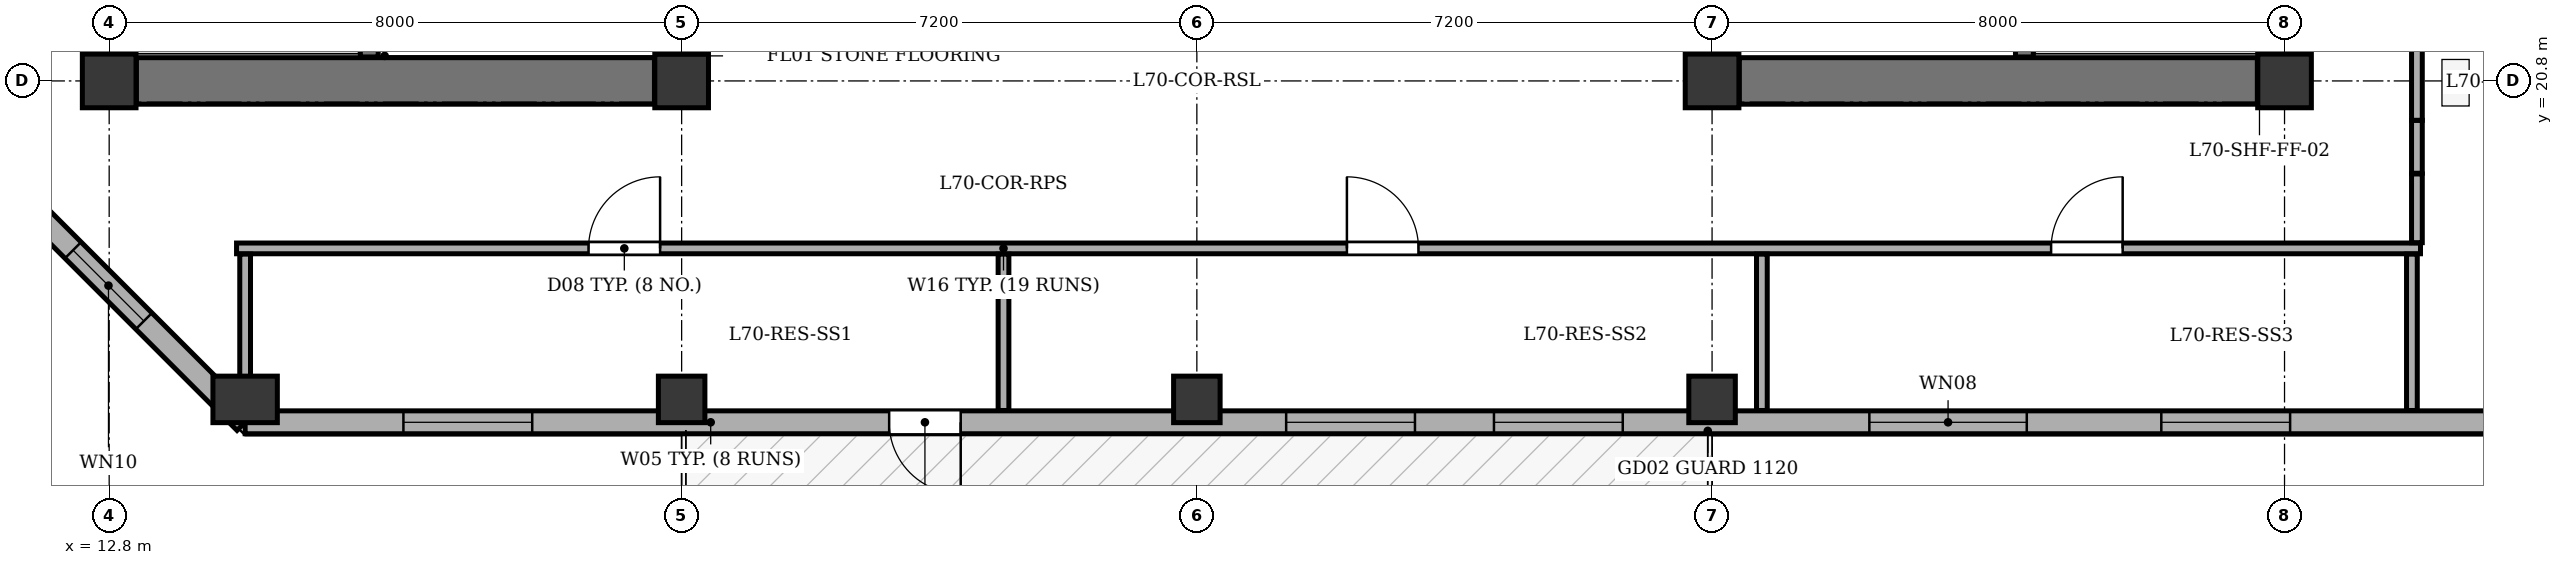
"""IFC4 building model, lengths in metres.
Left out: names, types, materials, properties, quantities, classifications, styles, units other than length and angle.
Written with IfcOpenShell. Run it as: python <this file> out.ifc"""

import sys

from ifc_helpers import new_model, si_unit, direction, frame, frame_2d, origin, origin_2d, place, context, subcontext, project, spatial, rectangle, extrude, element, fill, save


model = new_model("IFC4")
c1 = context("Model", 3, precision=1e-05, world=origin(), true_north=direction((0.0, 1.0)))
c2 = subcontext(c1, "Body", "Model", "MODEL_VIEW")
j1 = project(units=[si_unit("LENGTHUNIT", "METRE"), si_unit("PLANEANGLEUNIT", "RADIAN")], contexts=[c1])
p1 = place(None, origin())
s1 = spatial("IfcSite", under=j1, at=p1, CompositionType="ELEMENT")
p2 = place(p1, origin())
s2 = spatial("IfcBuilding", under=s1, at=p2, CompositionType="ELEMENT")
p3 = place(p2, frame((0.0, 0.0, 265.3)))
s3 = spatial("IfcBuildingStorey", under=s2, at=p3, CompositionType="ELEMENT", Elevation=265.3)
for number, where, z_axis, x_axis in (
    (1, (12.8, 20.8, 0.0), (0.0, 0.0, 1.0), (1.0, 0.0, 0.0)),
    (2, (20.8, 20.8, 0.0), (0.0, 0.0, 1.0), (1.0, 0.0, 0.0)),
    (3, (35.2, 20.8, 0.0), (0.0, 0.0, 1.0), (1.0, 0.0, 0.0)),
    (4, (43.2, 20.8, 0.0), (0.0, 0.0, 1.0), (1.0, 0.0, 0.0)),
):
    element("IfcColumn", number, at=place(p3, frame(where, z_axis=z_axis, x_axis=x_axis)), inside=s3, PredefinedType="COLUMN", context=c2, shape_type="SweptSolid", body=[
        extrude(rectangle(XDim=0.75, YDim=0.75, at=origin_2d()), origin(), (0.0, 0.0, 1.0), 3.4),
    ])
p4 = place(p3, frame((14.7, 16.35, 0.0), z_axis=(0.0, 0.0, 1.0), x_axis=(1.0, 0.0, 0.0)))
e5 = element("IfcColumn", 5, at=p4, inside=s3, PredefinedType="COLUMN", context=c2, shape_type="SweptSolid", body=[
    extrude(rectangle(XDim=0.65, YDim=0.9, at=origin_2d()), origin(), (0.0, 0.0, 1.0), 3.4),
])
for number, where, z_axis, x_axis in (
    (6, (20.8, 16.35, 0.0), (0.0, 0.0, 1.0), (1.0, 0.0, 0.0)),
    (7, (28.0, 16.35, 0.0), (0.0, 0.0, 1.0), (1.0, 0.0, 0.0)),
    (8, (35.2, 16.35, 0.0), (0.0, 0.0, 1.0), (1.0, 0.0, 0.0)),
):
    element("IfcColumn", number, at=place(p3, frame(where, z_axis=z_axis, x_axis=x_axis)), inside=s3, PredefinedType="COLUMN", context=c2, shape_type="SweptSolid", body=[
        extrude(rectangle(XDim=0.65, YDim=0.65, at=origin_2d()), origin(), (0.0, 0.0, 1.0), 3.4),
    ])
p5 = place(p3, frame((51.7, 16.03, 0.0), z_axis=(0.0, 0.0, 1.0), x_axis=(-1.0, 0.0, 0.0)))
e9 = element("IfcWall", 9, at=p5, inside=s3, PredefinedType="STANDARD", context=c2, shape_type="SweptSolid", body=[
    extrude(rectangle(XDim=37.0, YDim=0.32, at=frame_2d((18.5, 0.0))), origin(), (0.0, 0.0, 1.0), 2.335),
])
p6 = place(p5, frame((27.0, 0.0, 0.0)))
e10 = element("IfcOpeningElement", 10, at=p6, cuts=e9, PredefinedType="OPENING", context=c2, shape_type="SweptSolid", body=[
    extrude(rectangle(XDim=1.0, YDim=2.02, at=frame_2d((0.5, 1.01))), frame((0.0, 0.17, 0.0), z_axis=(0.0, -1.0, 0.0), x_axis=(1.0, 0.0, 0.0)), (0.0, 0.0, 1.0), 0.34),
])
p7 = place(p5, frame((2.375, 0.0, 0.75)))
e11 = element("IfcOpeningElement", 11, at=p7, cuts=e9, PredefinedType="OPENING", context=c2, shape_type="SweptSolid", body=[
    extrude(rectangle(XDim=1.8, YDim=1.465, at=frame_2d((0.9, 0.732))), frame((0.0, 0.17, 0.0), z_axis=(0.0, -1.0, 0.0), x_axis=(1.0, 0.0, 0.0)), (0.0, 0.0, 1.0), 0.34),
])
p8 = place(p5, frame((8.422, 0.0, 0.75)))
e12 = element("IfcOpeningElement", 12, at=p8, cuts=e9, PredefinedType="OPENING", context=c2, shape_type="SweptSolid", body=[
    extrude(rectangle(XDim=1.8, YDim=1.465, at=frame_2d((0.9, 0.732))), frame((0.0, 0.17, 0.0), z_axis=(0.0, -1.0, 0.0), x_axis=(1.0, 0.0, 0.0)), (0.0, 0.0, 1.0), 0.34),
])
p9 = place(p5, frame((12.102, 0.0, 0.75)))
e13 = element("IfcOpeningElement", 13, at=p9, cuts=e9, PredefinedType="OPENING", context=c2, shape_type="SweptSolid", body=[
    extrude(rectangle(XDim=2.2, YDim=1.465, at=frame_2d((1.1, 0.732))), frame((0.0, 0.17, 0.0), z_axis=(0.0, -1.0, 0.0), x_axis=(1.0, 0.0, 0.0)), (0.0, 0.0, 1.0), 0.34),
])
p10 = place(p5, frame((17.748, 0.0, 0.75)))
e14 = element("IfcOpeningElement", 14, at=p10, cuts=e9, PredefinedType="OPENING", context=c2, shape_type="SweptSolid", body=[
    extrude(rectangle(XDim=1.8, YDim=1.465, at=frame_2d((0.9, 0.732))), frame((0.0, 0.17, 0.0), z_axis=(0.0, -1.0, 0.0), x_axis=(1.0, 0.0, 0.0)), (0.0, 0.0, 1.0), 0.34),
])
p11 = place(p5, frame((20.652, 0.0, 0.75)))
e15 = element("IfcOpeningElement", 15, at=p11, cuts=e9, PredefinedType="OPENING", context=c2, shape_type="SweptSolid", body=[
    extrude(rectangle(XDim=1.8, YDim=1.465, at=frame_2d((0.9, 0.732))), frame((0.0, 0.17, 0.0), z_axis=(0.0, -1.0, 0.0), x_axis=(1.0, 0.0, 0.0)), (0.0, 0.0, 1.0), 0.34),
])
p12 = place(p5, frame((32.988, 0.0, 0.75)))
e16 = element("IfcOpeningElement", 16, at=p12, cuts=e9, PredefinedType="OPENING", context=c2, shape_type="SweptSolid", body=[
    extrude(rectangle(XDim=1.8, YDim=1.465, at=frame_2d((0.9, 0.732))), frame((0.0, 0.17, 0.0), z_axis=(0.0, -1.0, 0.0), x_axis=(1.0, 0.0, 0.0)), (0.0, 0.0, 1.0), 0.34),
])
p13 = place(p3, frame((14.7, 16.03, 0.0), z_axis=(0.0, 0.0, 1.0), x_axis=(-0.707106781187, 0.707106781187, 0.0)))
e17 = element("IfcWall", 17, at=p13, inside=s3, PredefinedType="STANDARD", context=c2, shape_type="SweptSolid", body=[
    extrude(rectangle(XDim=5.402, YDim=0.32, at=frame_2d((2.701, 0.0))), origin(), (0.0, 0.0, 1.0), 2.335),
])
p14 = place(p13, frame((2.001, 0.0, 0.75)))
e18 = element("IfcOpeningElement", 18, at=p14, cuts=e17, PredefinedType="OPENING", context=c2, shape_type="SweptSolid", body=[
    extrude(rectangle(XDim=1.4, YDim=1.465, at=frame_2d((0.7, 0.732))), frame((0.0, 0.17, 0.0), z_axis=(0.0, -1.0, 0.0), x_axis=(1.0, 0.0, 0.0)), (0.0, 0.0, 1.0), 0.34),
])
p15 = place(p3, frame((12.8, 21.18, 0.0), z_axis=(0.0, 0.0, 1.0), x_axis=(0.0, 1.0, 0.0)))
e19 = element("IfcWall", 19, at=p15, inside=s3, PredefinedType="SHEAR", context=c2, shape_type="SweptSolid", body=[
    extrude(rectangle(XDim=12.04, YDim=0.65, at=frame_2d((6.02, 0.0))), origin(), (0.0, 0.0, 1.0), 2.95),
])
p16 = place(p3, frame((13.18, 20.8, 0.0), z_axis=(0.0, 0.0, 1.0), x_axis=(1.0, 0.0, 0.0)))
e20 = element("IfcWall", 20, at=p16, inside=s3, PredefinedType="SHEAR", context=c2, shape_type="SweptSolid", body=[
    extrude(rectangle(XDim=7.24, YDim=0.65, at=frame_2d((3.62, 0.0))), origin(), (0.0, 0.0, 1.0), 2.95),
])
p17 = place(p3, frame((20.8, 21.18, 0.0), z_axis=(0.0, 0.0, 1.0), x_axis=(0.0, 1.0, 0.0)))
e21 = element("IfcWall", 21, at=p17, inside=s3, PredefinedType="SHEAR", context=c2, shape_type="SweptSolid", body=[
    extrude(rectangle(XDim=3.87, YDim=0.65, at=frame_2d((1.935, 0.0))), origin(), (0.0, 0.0, 1.0), 2.95),
])
p18 = place(p17, frame((1.42, 0.0, 0.0)))
e22 = element("IfcOpeningElement", 22, at=p18, cuts=e21, PredefinedType="OPENING", context=c2, shape_type="SweptSolid", body=[
    extrude(rectangle(XDim=1.2, YDim=2.15, at=frame_2d((0.6, 1.075))), frame((0.0, 0.335, 0.0), z_axis=(0.0, -1.0, 0.0), x_axis=(1.0, 0.0, 0.0)), (0.0, 0.0, 1.0), 0.67),
])
p19 = place(p3, frame((16.435, 21.135, 0.0), z_axis=(0.0, 0.0, 1.0), x_axis=(0.0, 1.0, 0.0)))
e23 = element("IfcWall", 23, at=p19, inside=s3, PredefinedType="SHEAR", context=c2, shape_type="SweptSolid", body=[
    extrude(rectangle(XDim=12.13, YDim=0.25, at=frame_2d((6.065, 0.0))), origin(), (0.0, 0.0, 1.0), 2.95),
])
p20 = place(p19, frame((0.515, 0.0, 0.0)))
e24 = element("IfcOpeningElement", 24, at=p20, cuts=e23, PredefinedType="OPENING", context=c2, shape_type="SweptSolid", body=[
    extrude(rectangle(XDim=1.2, YDim=2.15, at=frame_2d((0.6, 1.075))), frame((0.0, 0.135, 0.0), z_axis=(0.0, -1.0, 0.0), x_axis=(1.0, 0.0, 0.0)), (0.0, 0.0, 1.0), 0.27),
])
p21 = place(p19, frame((2.665, 0.0, 0.0)))
e25 = element("IfcOpeningElement", 25, at=p21, cuts=e23, PredefinedType="OPENING", context=c2, shape_type="SweptSolid", body=[
    extrude(rectangle(XDim=1.15, YDim=2.15, at=frame_2d((0.575, 1.075))), frame((0.0, 0.135, 0.0), z_axis=(0.0, -1.0, 0.0), x_axis=(1.0, 0.0, 0.0)), (0.0, 0.0, 1.0), 0.27),
])
p22 = place(p3, frame((43.2, 21.18, 0.0), z_axis=(0.0, 0.0, 1.0), x_axis=(0.0, 1.0, 0.0)))
e26 = element("IfcWall", 26, at=p22, inside=s3, PredefinedType="SHEAR", context=c2, shape_type="SweptSolid", body=[
    extrude(rectangle(XDim=12.04, YDim=0.65, at=frame_2d((6.02, 0.0))), origin(), (0.0, 0.0, 1.0), 2.95),
])
p23 = place(p3, frame((35.58, 20.8, 0.0), z_axis=(0.0, 0.0, 1.0), x_axis=(1.0, 0.0, 0.0)))
e27 = element("IfcWall", 27, at=p23, inside=s3, PredefinedType="SHEAR", context=c2, shape_type="SweptSolid", body=[
    extrude(rectangle(XDim=7.24, YDim=0.65, at=frame_2d((3.62, 0.0))), origin(), (0.0, 0.0, 1.0), 2.95),
])
p24 = place(p3, frame((35.2, 21.18, 0.0), z_axis=(0.0, 0.0, 1.0), x_axis=(0.0, 1.0, 0.0)))
e28 = element("IfcWall", 28, at=p24, inside=s3, PredefinedType="SHEAR", context=c2, shape_type="SweptSolid", body=[
    extrude(rectangle(XDim=3.87, YDim=0.65, at=frame_2d((1.935, 0.0))), origin(), (0.0, 0.0, 1.0), 2.95),
])
p25 = place(p24, frame((1.42, 0.0, 0.0)))
e29 = element("IfcOpeningElement", 29, at=p25, cuts=e28, PredefinedType="OPENING", context=c2, shape_type="SweptSolid", body=[
    extrude(rectangle(XDim=1.2, YDim=2.15, at=frame_2d((0.6, 1.075))), frame((0.0, 0.335, 0.0), z_axis=(0.0, -1.0, 0.0), x_axis=(1.0, 0.0, 0.0)), (0.0, 0.0, 1.0), 0.67),
])
p26 = place(p3, frame((39.565, 21.135, 0.0), z_axis=(0.0, 0.0, 1.0), x_axis=(0.0, 1.0, 0.0)))
e30 = element("IfcWall", 30, at=p26, inside=s3, PredefinedType="SHEAR", context=c2, shape_type="SweptSolid", body=[
    extrude(rectangle(XDim=12.13, YDim=0.25, at=frame_2d((6.065, 0.0))), origin(), (0.0, 0.0, 1.0), 2.95),
])
p27 = place(p26, frame((0.515, 0.0, 0.0)))
e31 = element("IfcOpeningElement", 31, at=p27, cuts=e30, PredefinedType="OPENING", context=c2, shape_type="SweptSolid", body=[
    extrude(rectangle(XDim=1.2, YDim=2.15, at=frame_2d((0.6, 1.075))), frame((0.0, 0.135, 0.0), z_axis=(0.0, -1.0, 0.0), x_axis=(1.0, 0.0, 0.0)), (0.0, 0.0, 1.0), 0.27),
])
p28 = place(p26, frame((2.665, 0.0, 0.0)))
e32 = element("IfcOpeningElement", 32, at=p28, cuts=e30, PredefinedType="OPENING", context=c2, shape_type="SweptSolid", body=[
    extrude(rectangle(XDim=1.15, YDim=2.15, at=frame_2d((0.575, 1.075))), frame((0.0, 0.135, 0.0), z_axis=(0.0, -1.0, 0.0), x_axis=(1.0, 0.0, 0.0)), (0.0, 0.0, 1.0), 0.27),
])
p29 = place(p3, frame((14.58, 18.46, 0.0), z_axis=(0.0, 0.0, 1.0), x_axis=(1.0, 0.0, 0.0)))
e33 = element("IfcWall", 33, at=p29, inside=s3, PredefinedType="PARTITIONING", context=c2, shape_type="SweptSolid", body=[
    extrude(rectangle(XDim=30.52, YDim=0.15, at=frame_2d((15.26, 0.0))), origin(), (0.0, 0.0, 1.0), 2.95),
])
p30 = place(p29, frame((4.919, 0.0, 0.0)))
e34 = element("IfcOpeningElement", 34, at=p30, cuts=e33, PredefinedType="OPENING", context=c2, shape_type="SweptSolid", body=[
    extrude(rectangle(XDim=1.0, YDim=2.1, at=frame_2d((0.5, 1.05))), frame((0.0, 0.085, 0.0), z_axis=(0.0, -1.0, 0.0), x_axis=(1.0, 0.0, 0.0)), (0.0, 0.0, 1.0), 0.17),
])
p31 = place(p29, frame((15.517, 0.0, 0.0)))
e35 = element("IfcOpeningElement", 35, at=p31, cuts=e33, PredefinedType="OPENING", context=c2, shape_type="SweptSolid", body=[
    extrude(rectangle(XDim=1.0, YDim=2.1, at=frame_2d((0.5, 1.05))), frame((0.0, 0.085, 0.0), z_axis=(0.0, -1.0, 0.0), x_axis=(1.0, 0.0, 0.0)), (0.0, 0.0, 1.0), 0.17),
])
p32 = place(p29, frame((25.358, 0.0, 0.0)))
e36 = element("IfcOpeningElement", 36, at=p32, cuts=e33, PredefinedType="OPENING", context=c2, shape_type="SweptSolid", body=[
    extrude(rectangle(XDim=1.0, YDim=2.1, at=frame_2d((0.5, 1.05))), frame((0.0, 0.085, 0.0), z_axis=(0.0, -1.0, 0.0), x_axis=(1.0, 0.0, 0.0)), (0.0, 0.0, 1.0), 0.17),
])
for number, where, z_axis, x_axis in (
    (37, (14.7, 16.195, 0.0), (0.0, 0.0, 1.0), (0.0, 1.0, 0.0)),
    (38, (25.298, 16.195, 0.0), (0.0, 0.0, 1.0), (0.0, 1.0, 0.0)),
    (39, (35.896, 16.195, 0.0), (0.0, 0.0, 1.0), (0.0, 1.0, 0.0)),
    (40, (44.98, 16.195, 0.0), (0.0, 0.0, 1.0), (0.0, 1.0, 0.0)),
):
    element("IfcWall", number, at=place(p3, frame(where, z_axis=z_axis, x_axis=x_axis)), inside=s3, PredefinedType="PARTITIONING", context=c2, shape_type="SweptSolid", body=[
        extrude(rectangle(XDim=2.185, YDim=0.15, at=frame_2d((1.092, 0.0))), origin(), (0.0, 0.0, 1.0), 2.95),
    ])
p33 = place(p3, frame((45.05, 19.5, 0.0), z_axis=(0.0, 0.0, 1.0), x_axis=(0.0, -1.0, 0.0)))
e41 = element("IfcWall", 41, at=p33, inside=s3, PredefinedType="PARTITIONING", context=c2, shape_type="SweptSolid", body=[
    extrude(rectangle(XDim=0.96, YDim=0.15, at=frame_2d((0.48, 0.0))), origin(), (0.0, 0.0, 1.0), 2.135),
])
p34 = place(p3, frame((45.05, 19.51, 0.0), z_axis=(0.0, 0.0, 1.0), x_axis=(0.0, 1.0, 0.0)))
e42 = element("IfcWall", 42, at=p34, inside=s3, PredefinedType="PARTITIONING", context=c2, shape_type="SweptSolid", body=[
    extrude(rectangle(XDim=0.74, YDim=0.15, at=frame_2d((0.37, 0.0))), origin(), (0.0, 0.0, 1.0), 2.135),
])
p35 = place(p3, frame((45.05, 20.25, 0.0), z_axis=(0.0, 0.0, 1.0), x_axis=(0.0, 1.0, 0.0)))
e43 = element("IfcWall", 43, at=p35, inside=s3, PredefinedType="PARTITIONING", context=c2, shape_type="SweptSolid", body=[
    extrude(rectangle(XDim=13.9, YDim=0.15, at=frame_2d((6.95, 0.0))), origin(), (0.0, 0.0, 1.0), 2.135),
])
p36 = place(p6, origin())
e44 = element("IfcDoor", 44, at=p36, inside=s3, OperationType="SINGLE_SWING_LEFT", PredefinedType="DOOR", context=c2, shape_type="SweptSolid", body=[
    extrude(rectangle(XDim=1.0, YDim=2.02, at=frame_2d((0.5, 1.01))), frame((0.0, 0.025, 0.0), z_axis=(0.0, -1.0, 0.0), x_axis=(1.0, 0.0, 0.0)), (0.0, 0.0, 1.0), 0.05),
])
fill(e10, e44)
p37 = place(p8, origin())
e45 = element("IfcWindow", 45, at=p37, inside=s3, PartitioningType="SINGLE_PANEL", PredefinedType="WINDOW", context=c2, shape_type="SweptSolid", body=[
    extrude(rectangle(XDim=1.8, YDim=1.465, at=frame_2d((0.9, 0.732))), frame((0.0, -0.01, 0.0), z_axis=(0.0, -1.0, 0.0), x_axis=(1.0, 0.0, 0.0)), (0.0, 0.0, 1.0), 0.06),
])
fill(e12, e45)
p38 = place(p9, origin())
e46 = element("IfcWindow", 46, at=p38, inside=s3, PartitioningType="SINGLE_PANEL", PredefinedType="WINDOW", context=c2, shape_type="SweptSolid", body=[
    extrude(rectangle(XDim=2.2, YDim=1.465, at=frame_2d((1.1, 0.732))), frame((0.0, -0.01, 0.0), z_axis=(0.0, -1.0, 0.0), x_axis=(1.0, 0.0, 0.0)), (0.0, 0.0, 1.0), 0.06),
])
fill(e13, e46)
p39 = place(p10, origin())
e47 = element("IfcWindow", 47, at=p39, inside=s3, PartitioningType="SINGLE_PANEL", PredefinedType="WINDOW", context=c2, shape_type="SweptSolid", body=[
    extrude(rectangle(XDim=1.8, YDim=1.465, at=frame_2d((0.9, 0.732))), frame((0.0, -0.01, 0.0), z_axis=(0.0, -1.0, 0.0), x_axis=(1.0, 0.0, 0.0)), (0.0, 0.0, 1.0), 0.06),
])
fill(e14, e47)
p40 = place(p11, origin())
e48 = element("IfcWindow", 48, at=p40, inside=s3, PartitioningType="SINGLE_PANEL", PredefinedType="WINDOW", context=c2, shape_type="SweptSolid", body=[
    extrude(rectangle(XDim=1.8, YDim=1.465, at=frame_2d((0.9, 0.732))), frame((0.0, -0.01, 0.0), z_axis=(0.0, -1.0, 0.0), x_axis=(1.0, 0.0, 0.0)), (0.0, 0.0, 1.0), 0.06),
])
fill(e15, e48)
p41 = place(p12, origin())
e49 = element("IfcWindow", 49, at=p41, inside=s3, PartitioningType="SINGLE_PANEL", PredefinedType="WINDOW", context=c2, shape_type="SweptSolid", body=[
    extrude(rectangle(XDim=1.8, YDim=1.465, at=frame_2d((0.9, 0.732))), frame((0.0, -0.01, 0.0), z_axis=(0.0, -1.0, 0.0), x_axis=(1.0, 0.0, 0.0)), (0.0, 0.0, 1.0), 0.06),
])
fill(e16, e49)
p42 = place(p14, origin())
e50 = element("IfcWindow", 50, at=p42, inside=s3, PartitioningType="SINGLE_PANEL", PredefinedType="WINDOW", context=c2, shape_type="SweptSolid", body=[
    extrude(rectangle(XDim=1.4, YDim=1.465, at=frame_2d((0.7, 0.732))), frame((0.0, -0.01, 0.0), z_axis=(0.0, -1.0, 0.0), x_axis=(1.0, 0.0, 0.0)), (0.0, 0.0, 1.0), 0.06),
])
fill(e18, e50)
p43 = place(p30, origin())
e51 = element("IfcDoor", 51, at=p43, inside=s3, OperationType="SINGLE_SWING_RIGHT", PredefinedType="DOOR", context=c2, shape_type="SweptSolid", body=[
    extrude(rectangle(XDim=1.0, YDim=2.1, at=frame_2d((0.5, 1.05))), frame((0.0, 0.025, 0.0), z_axis=(0.0, -1.0, 0.0), x_axis=(1.0, 0.0, 0.0)), (0.0, 0.0, 1.0), 0.05),
])
fill(e34, e51)
p44 = place(p31, origin())
e52 = element("IfcDoor", 52, at=p44, inside=s3, OperationType="SINGLE_SWING_LEFT", PredefinedType="DOOR", context=c2, shape_type="SweptSolid", body=[
    extrude(rectangle(XDim=1.0, YDim=2.1, at=frame_2d((0.5, 1.05))), frame((0.0, 0.025, 0.0), z_axis=(0.0, -1.0, 0.0), x_axis=(1.0, 0.0, 0.0)), (0.0, 0.0, 1.0), 0.05),
])
fill(e35, e52)
p45 = place(p32, origin())
e53 = element("IfcDoor", 53, at=p45, inside=s3, OperationType="SINGLE_SWING_RIGHT", PredefinedType="DOOR", context=c2, shape_type="SweptSolid", body=[
    extrude(rectangle(XDim=1.0, YDim=2.1, at=frame_2d((0.5, 1.05))), frame((0.0, 0.025, 0.0), z_axis=(0.0, -1.0, 0.0), x_axis=(1.0, 0.0, 0.0)), (0.0, 0.0, 1.0), 0.05),
])
fill(e36, e53)
save(model, sys.argv[1])
